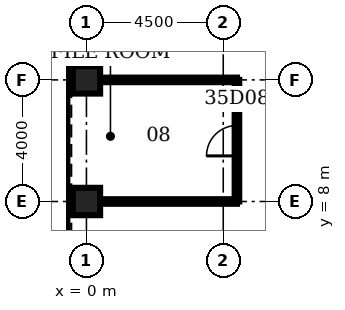
"""IFC4 building model, lengths in metres.
Left out: names, types, materials, properties, quantities, classifications, styles, units other than length and angle.
Written with IfcOpenShell. Run it as: python <this file> out.ifc"""

import sys

from ifc_helpers import new_model, si_unit, direction, frame, frame_2d, origin, origin_2d, place, context, subcontext, project, spatial, rectangle, hollow_rectangle, extrude, element, fill, save


model = new_model("IFC4")
c1 = context("Model", 3, precision=1e-05, world=origin(), true_north=direction((0.0, 1.0)))
c2 = subcontext(c1, "Body", "Model", "MODEL_VIEW")
j1 = project(units=[si_unit("LENGTHUNIT", "METRE"), si_unit("PLANEANGLEUNIT", "RADIAN")], contexts=[c1])
p1 = place(None, origin())
s1 = spatial("IfcSite", under=j1, at=p1, CompositionType="ELEMENT")
p2 = place(p1, origin())
s2 = spatial("IfcBuilding", under=s1, at=p2, CompositionType="ELEMENT")
p3 = place(p2, frame((0.0, 0.0, 159.3)))
s3 = spatial("IfcBuildingStorey", under=s2, at=p3, CompositionType="ELEMENT", Elevation=159.3)
for number, where, z_axis, x_axis in (
    (1, (0.0, 12.0, 0.0), (0.0, 0.0, 1.0), (1.0, 0.0, 0.0)),
    (2, (0.0, 8.0, 0.0), (0.0, 0.0, 1.0), (1.0, 0.0, 0.0)),
):
    element("IfcColumn", number, at=place(p3, frame(where, z_axis=z_axis, x_axis=x_axis)), inside=s3, PredefinedType="COLUMN", context=c2, shape_type="SweptSolid", body=[
        extrude(hollow_rectangle(XDim=0.9, YDim=0.9, WallThickness=0.1, at=origin_2d()), origin(), (0.0, 0.0, 1.0), 4.2),
    ])
for number, where, z_axis, x_axis in (
    (3, (0.45, 8.0, 0.0), (0.0, 0.0, 1.0), (1.0, 0.0, 0.0)),
    (4, (0.45, 12.0, 0.0), (0.0, 0.0, 1.0), (1.0, 0.0, 0.0)),
):
    element("IfcWall", number, at=place(p3, frame(where, z_axis=z_axis, x_axis=x_axis)), inside=s3, PredefinedType="PARTITIONING", context=c2, shape_type="SweptSolid", body=[
        extrude(rectangle(XDim=4.5, YDim=0.15, at=frame_2d((2.25, 0.0))), origin(), (0.0, 0.0, 1.0), 3.0),
    ])
p4 = place(p3, frame((4.95, 8.0, 0.0), z_axis=(0.0, 0.0, 1.0), x_axis=(0.0, 1.0, 0.0)))
e5 = element("IfcWall", 5, at=p4, inside=s3, PredefinedType="PARTITIONING", context=c2, shape_type="SweptSolid", body=[
    extrude(rectangle(XDim=4.0, YDim=0.15, at=frame_2d((2.0, 0.0))), origin(), (0.0, 0.0, 1.0), 3.0),
])
p5 = place(p4, frame((1.5, 0.0, 0.0)))
e6 = element("IfcOpeningElement", 6, at=p5, cuts=e5, PredefinedType="OPENING", context=c2, shape_type="SweptSolid", body=[
    extrude(rectangle(XDim=1.0, YDim=2.1, at=frame_2d((0.5, 1.05))), frame((0.0, 0.085, 0.0), z_axis=(0.0, -1.0, 0.0), x_axis=(1.0, 0.0, 0.0)), (0.0, 0.0, 1.0), 0.17),
])
p6 = place(p5, origin())
e7 = element("IfcDoor", 7, at=p6, inside=s3, OperationType="SINGLE_SWING_LEFT", PredefinedType="DOOR", context=c2, shape_type="SweptSolid", body=[
    extrude(rectangle(XDim=1.0, YDim=2.1, at=frame_2d((0.5, 1.05))), frame((0.0, 0.025, 0.0), z_axis=(0.0, -1.0, 0.0), x_axis=(1.0, 0.0, 0.0)), (0.0, 0.0, 1.0), 0.05),
])
fill(e6, e7)
save(model, sys.argv[1])
